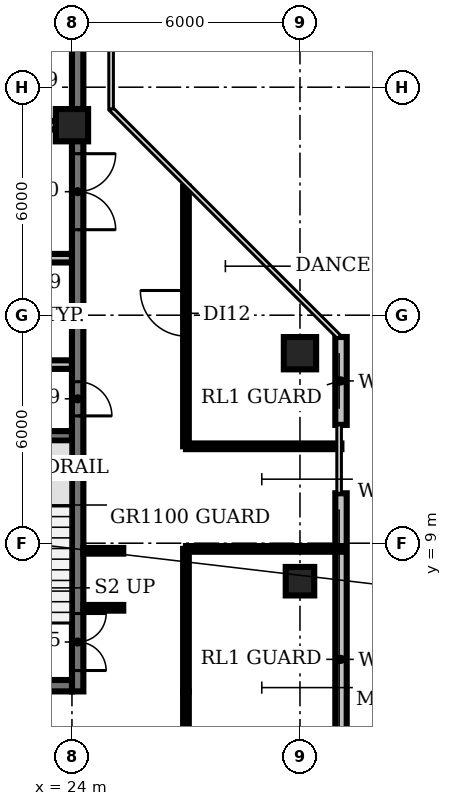
"""IFC4 building model, lengths in metres.
Left out: names, types, materials, properties, quantities, classifications, styles, units other than length and angle.
Written with IfcOpenShell. Run it as: python <this file> out.ifc"""

import sys

from ifc_helpers import new_model, si_unit, direction, frame, frame_2d, origin, origin_2d, place, context, subcontext, project, spatial, rectangle, circle, extrude, element, fill, save


model = new_model("IFC4")
c1 = context("Model", 3, precision=1e-05, world=origin(), true_north=direction((0.0, 1.0)))
c2 = subcontext(c1, "Body", "Model", "MODEL_VIEW")
j1 = project(units=[si_unit("LENGTHUNIT", "METRE"), si_unit("PLANEANGLEUNIT", "RADIAN")], contexts=[c1])
p1 = place(None, origin())
s1 = spatial("IfcSite", under=j1, at=p1, CompositionType="ELEMENT")
p2 = place(p1, origin())
s2 = spatial("IfcBuilding", under=s1, at=p2, CompositionType="ELEMENT")
p3 = place(p2, frame((0.0, 0.0, 268.4)))
s3 = spatial("IfcBuildingStorey", under=s2, at=p3, CompositionType="ELEMENT", Elevation=268.4)
p4 = place(p3, frame((24.0, 20.0, 0.0), z_axis=(0.0, 0.0, 1.0), x_axis=(1.0, 0.0, 0.0)))
e1 = element("IfcColumn", 1, at=p4, inside=s3, PredefinedType="COLUMN", context=c2, shape_type="SweptSolid", body=[
    extrude(circle(Radius=0.425, at=origin_2d()), origin(), (0.0, 0.0, 1.0), 3.8),
])
p5 = place(p3, frame((30.0, 8.0, 0.0), z_axis=(0.0, 0.0, 1.0), x_axis=(1.0, 0.0, 0.0)))
e2 = element("IfcColumn", 2, at=p5, inside=s3, PredefinedType="COLUMN", context=c2, shape_type="SweptSolid", body=[
    extrude(rectangle(XDim=0.75, YDim=0.75, at=origin_2d()), origin(), (0.0, 0.0, 1.0), 3.8),
])
p6 = place(p3, frame((30.0, 14.0, 0.0), z_axis=(0.0, 0.0, 1.0), x_axis=(1.0, 0.0, 0.0)))
e3 = element("IfcColumn", 3, at=p6, inside=s3, PredefinedType="COLUMN", context=c2, shape_type="SweptSolid", body=[
    extrude(circle(Radius=0.425, at=origin_2d()), origin(), (0.0, 0.0, 1.0), 3.8),
])
p7 = place(p3, frame((31.08, 1.573, 0.0), z_axis=(0.0, 0.0, 1.0), x_axis=(0.0, 1.0, 0.0)))
e4 = element("IfcWall", 4, at=p7, inside=s3, PredefinedType="SOLIDWALL", context=c2, shape_type="SweptSolid", body=[
    extrude(rectangle(XDim=8.74, YDim=0.3, at=frame_2d((4.37, 0.0))), origin(), (0.0, 0.0, 1.0), 3.8),
])
p8 = place(p3, frame((31.08, 12.113, 0.0), z_axis=(0.0, 0.0, 1.0), x_axis=(0.0, 1.0, 0.0)))
e5 = element("IfcWall", 5, at=p8, inside=s3, PredefinedType="SOLIDWALL", context=c2, shape_type="SweptSolid", body=[
    extrude(rectangle(XDim=2.313, YDim=0.3, at=frame_2d((1.157, 0.0))), origin(), (0.0, 0.0, 1.0), 3.8),
])
p9 = place(p3, frame((20.85, 11.825, 0.0), z_axis=(0.0, 0.0, 1.0), x_axis=(1.0, 0.0, 0.0)))
e6 = element("IfcWall", 6, at=p9, inside=s3, PredefinedType="SHEAR", context=c2, shape_type="SweptSolid", body=[
    extrude(rectangle(XDim=3.15, YDim=0.25, at=frame_2d((1.575, 0.0))), origin(), (0.0, 0.0, 1.0), 3.8),
])
p10 = place(p3, frame((16.6, 13.7, 0.0), z_axis=(0.0, 0.0, 1.0), x_axis=(1.0, 0.0, 0.0)))
e7 = element("IfcWall", 7, at=p10, inside=s3, PredefinedType="PARTITIONING", context=c2, shape_type="SweptSolid", body=[
    extrude(rectangle(XDim=7.4, YDim=0.225, at=frame_2d((3.7, 0.0))), origin(), (0.0, 0.0, 1.0), 3.8),
])
p11 = place(p3, frame((9.4, 16.5, 0.0), z_axis=(0.0, 0.0, 1.0), x_axis=(1.0, 0.0, 0.0)))
e8 = element("IfcWall", 8, at=p11, inside=s3, PredefinedType="PARTITIONING", context=c2, shape_type="SweptSolid", body=[
    extrude(rectangle(XDim=14.6, YDim=0.225, at=frame_2d((7.3, 0.0))), origin(), (0.0, 0.0, 1.0), 3.8),
])
p12 = place(p11, frame((0.85, 0.0, 0.0)))
e9 = element("IfcOpeningElement", 9, at=p12, cuts=e8, PredefinedType="OPENING", context=c2, shape_type="SweptSolid", body=[
    extrude(rectangle(XDim=0.9, YDim=2.1, at=frame_2d((0.45, 1.05))), frame((0.0, 0.123, 0.0), z_axis=(0.0, -1.0, 0.0), x_axis=(1.0, 0.0, 0.0)), (0.0, 0.0, 1.0), 0.245),
])
p13 = place(p11, frame((3.625, 0.0, 0.0)))
e10 = element("IfcOpeningElement", 10, at=p13, cuts=e8, PredefinedType="OPENING", context=c2, shape_type="SweptSolid", body=[
    extrude(rectangle(XDim=0.9, YDim=2.1, at=frame_2d((0.45, 1.05))), frame((0.0, 0.123, 0.0), z_axis=(0.0, -1.0, 0.0), x_axis=(1.0, 0.0, 0.0)), (0.0, 0.0, 1.0), 0.245),
])
p14 = place(p11, frame((7.775, 0.0, 0.0)))
e11 = element("IfcOpeningElement", 11, at=p14, cuts=e8, PredefinedType="OPENING", context=c2, shape_type="SweptSolid", body=[
    extrude(rectangle(XDim=1.0, YDim=2.1, at=frame_2d((0.5, 1.05))), frame((0.0, 0.123, 0.0), z_axis=(0.0, -1.0, 0.0), x_axis=(1.0, 0.0, 0.0)), (0.0, 0.0, 1.0), 0.245),
])
p15 = place(p11, frame((11.308, 0.0, 0.0)))
e12 = element("IfcOpeningElement", 12, at=p15, cuts=e8, PredefinedType="OPENING", context=c2, shape_type="SweptSolid", body=[
    extrude(rectangle(XDim=0.9, YDim=2.1, at=frame_2d((0.45, 1.05))), frame((0.0, 0.123, 0.0), z_axis=(0.0, -1.0, 0.0), x_axis=(1.0, 0.0, 0.0)), (0.0, 0.0, 1.0), 0.245),
])
p16 = place(p11, frame((13.083, 0.0, 0.0)))
e13 = element("IfcOpeningElement", 13, at=p16, cuts=e8, PredefinedType="OPENING", context=c2, shape_type="SweptSolid", body=[
    extrude(rectangle(XDim=0.9, YDim=2.1, at=frame_2d((0.45, 1.05))), frame((0.0, 0.123, 0.0), z_axis=(0.0, -1.0, 0.0), x_axis=(1.0, 0.0, 0.0)), (0.0, 0.0, 1.0), 0.245),
])
p17 = place(p3, frame((24.0, 20.0, 0.0), z_axis=(0.0, 0.0, 1.0), x_axis=(-1.0, 0.0, 0.0)))
e14 = element("IfcWall", 14, at=p17, inside=s3, PredefinedType="PARTITIONING", context=c2, shape_type="SweptSolid", body=[
    extrude(rectangle(XDim=14.6, YDim=0.225, at=frame_2d((7.3, 0.0))), origin(), (0.0, 0.0, 1.0), 3.8),
])
p18 = place(p17, frame((12.75, 0.0, 0.0)))
e15 = element("IfcOpeningElement", 15, at=p18, cuts=e14, PredefinedType="OPENING", context=c2, shape_type="SweptSolid", body=[
    extrude(rectangle(XDim=1.1, YDim=2.1, at=frame_2d((0.55, 1.05))), frame((0.0, 0.123, 0.0), z_axis=(0.0, -1.0, 0.0), x_axis=(1.0, 0.0, 0.0)), (0.0, 0.0, 1.0), 0.245),
])
p19 = place(p17, frame((9.95, 0.0, 0.0)))
e16 = element("IfcOpeningElement", 16, at=p19, cuts=e14, PredefinedType="OPENING", context=c2, shape_type="SweptSolid", body=[
    extrude(rectangle(XDim=1.1, YDim=2.1, at=frame_2d((0.55, 1.05))), frame((0.0, 0.123, 0.0), z_axis=(0.0, -1.0, 0.0), x_axis=(1.0, 0.0, 0.0)), (0.0, 0.0, 1.0), 0.245),
])
p20 = place(p17, frame((7.15, 0.0, 0.0)))
e17 = element("IfcOpeningElement", 17, at=p20, cuts=e14, PredefinedType="OPENING", context=c2, shape_type="SweptSolid", body=[
    extrude(rectangle(XDim=1.1, YDim=2.1, at=frame_2d((0.55, 1.05))), frame((0.0, 0.123, 0.0), z_axis=(0.0, -1.0, 0.0), x_axis=(1.0, 0.0, 0.0)), (0.0, 0.0, 1.0), 0.245),
])
p21 = place(p17, frame((4.35, 0.0, 0.0)))
e18 = element("IfcOpeningElement", 18, at=p21, cuts=e14, PredefinedType="OPENING", context=c2, shape_type="SweptSolid", body=[
    extrude(rectangle(XDim=1.1, YDim=2.1, at=frame_2d((0.55, 1.05))), frame((0.0, 0.123, 0.0), z_axis=(0.0, -1.0, 0.0), x_axis=(1.0, 0.0, 0.0)), (0.0, 0.0, 1.0), 0.245),
])
p22 = place(p17, frame((2.308, 0.0, 0.0)))
e19 = element("IfcOpeningElement", 19, at=p22, cuts=e14, PredefinedType="OPENING", context=c2, shape_type="SweptSolid", body=[
    extrude(rectangle(XDim=0.9, YDim=2.1, at=frame_2d((0.45, 1.05))), frame((0.0, 0.123, 0.0), z_axis=(0.0, -1.0, 0.0), x_axis=(1.0, 0.0, 0.0)), (0.0, 0.0, 1.0), 0.245),
])
p23 = place(p17, frame((0.633, 0.0, 0.0)))
e20 = element("IfcOpeningElement", 20, at=p23, cuts=e14, PredefinedType="OPENING", context=c2, shape_type="SweptSolid", body=[
    extrude(rectangle(XDim=0.9, YDim=2.1, at=frame_2d((0.45, 1.05))), frame((0.0, 0.123, 0.0), z_axis=(0.0, -1.0, 0.0), x_axis=(1.0, 0.0, 0.0)), (0.0, 0.0, 1.0), 0.245),
])
p24 = place(p3, frame((24.15, 25.655, 0.0), z_axis=(0.0, 0.0, 1.0), x_axis=(0.0, -1.0, 0.0)))
e21 = element("IfcWall", 21, at=p24, inside=s3, PredefinedType="SHEAR", context=c2, shape_type="SweptSolid", body=[
    extrude(rectangle(XDim=20.555, YDim=0.3, at=frame_2d((10.277, 0.0))), origin(), (0.0, 0.0, 1.0), 3.8),
])
p25 = place(p24, frame((18.505, 0.0, 0.0)))
e22 = element("IfcOpeningElement", 22, at=p25, cuts=e21, PredefinedType="OPENING", context=c2, shape_type="SweptSolid", body=[
    extrude(rectangle(XDim=1.5, YDim=2.1, at=frame_2d((0.75, 1.05))), frame((0.0, 0.16, 0.0), z_axis=(0.0, -1.0, 0.0), x_axis=(1.0, 0.0, 0.0)), (0.0, 0.0, 1.0), 0.32),
])
p26 = place(p24, frame((12.405, 0.0, 0.0)))
e23 = element("IfcOpeningElement", 23, at=p26, cuts=e21, PredefinedType="OPENING", context=c2, shape_type="SweptSolid", body=[
    extrude(rectangle(XDim=0.9, YDim=2.1, at=frame_2d((0.45, 1.05))), frame((0.0, 0.16, 0.0), z_axis=(0.0, -1.0, 0.0), x_axis=(1.0, 0.0, 0.0)), (0.0, 0.0, 1.0), 0.32),
])
p27 = place(p24, frame((6.405, 0.0, 0.0)))
e24 = element("IfcOpeningElement", 24, at=p27, cuts=e21, PredefinedType="OPENING", context=c2, shape_type="SweptSolid", body=[
    extrude(rectangle(XDim=2.0, YDim=2.1, at=frame_2d((1.0, 1.05))), frame((0.0, 0.16, 0.0), z_axis=(0.0, -1.0, 0.0), x_axis=(1.0, 0.0, 0.0)), (0.0, 0.0, 1.0), 0.32),
])
p28 = place(p3, frame((24.0, 5.25, 0.0), z_axis=(0.0, 0.0, 1.0), x_axis=(-1.0, 0.0, 0.0)))
e25 = element("IfcWall", 25, at=p28, inside=s3, PredefinedType="SHEAR", context=c2, shape_type="SweptSolid", body=[
    extrude(rectangle(XDim=18.0, YDim=0.3, at=frame_2d((9.0, 0.0))), origin(), (0.0, 0.0, 1.0), 3.8),
])
p29 = place(p28, frame((13.0, 0.0, 0.0)))
e26 = element("IfcOpeningElement", 26, at=p29, cuts=e25, PredefinedType="OPENING", context=c2, shape_type="SweptSolid", body=[
    extrude(rectangle(XDim=1.2, YDim=2.1, at=frame_2d((0.6, 1.05))), frame((0.0, 0.16, 0.0), z_axis=(0.0, -1.0, 0.0), x_axis=(1.0, 0.0, 0.0)), (0.0, 0.0, 1.0), 0.32),
])
p30 = place(p28, frame((4.9, 0.0, 0.0)))
e27 = element("IfcOpeningElement", 27, at=p30, cuts=e25, PredefinedType="OPENING", context=c2, shape_type="SweptSolid", body=[
    extrude(rectangle(XDim=1.0, YDim=2.1, at=frame_2d((0.5, 1.05))), frame((0.0, 0.16, 0.0), z_axis=(0.0, -1.0, 0.0), x_axis=(1.0, 0.0, 0.0)), (0.0, 0.0, 1.0), 0.32),
])
for number, where, z_axis, x_axis in (
    (28, (24.3, 7.3, 0.0), (0.0, 0.0, 1.0), (1.0, 0.0, 0.0)),
    (29, (24.3, 8.8, 0.0), (0.0, 0.0, 1.0), (1.0, 0.0, 0.0)),
):
    element("IfcWall", number, at=place(p3, frame(where, z_axis=z_axis, x_axis=x_axis)), inside=s3, PredefinedType="PARTITIONING", context=c2, shape_type="SweptSolid", body=[
        extrude(rectangle(XDim=1.05, YDim=0.15, at=frame_2d((0.525, 0.0))), origin(), (0.0, 0.0, 1.0), 2.85),
    ])
p31 = place(p3, frame((27.0, 1.2, 0.0), z_axis=(0.0, 0.0, 1.0), x_axis=(0.0, 1.0, 0.0)))
e30 = element("IfcWall", 30, at=p31, inside=s3, PredefinedType="PARTITIONING", context=c2, shape_type="SweptSolid", body=[
    extrude(rectangle(XDim=3.9, YDim=0.15, at=frame_2d((1.95, 0.0))), origin(), (0.0, 0.0, 1.0), 2.85),
])
p32 = place(p31, frame((1.4, 0.0, 0.0)))
e31 = element("IfcOpeningElement", 31, at=p32, cuts=e30, PredefinedType="OPENING", context=c2, shape_type="SweptSolid", body=[
    extrude(rectangle(XDim=1.2, YDim=2.1, at=frame_2d((0.6, 1.05))), frame((0.0, 0.085, 0.0), z_axis=(0.0, -1.0, 0.0), x_axis=(1.0, 0.0, 0.0)), (0.0, 0.0, 1.0), 0.17),
])
p33 = place(p3, frame((27.0, 5.1, 0.0), z_axis=(0.0, 0.0, 1.0), x_axis=(0.0, 1.0, 0.0)))
e32 = element("IfcWall", 32, at=p33, inside=s3, PredefinedType="PARTITIONING", context=c2, shape_type="SweptSolid", body=[
    extrude(rectangle(XDim=3.75, YDim=0.15, at=frame_2d((1.875, 0.0))), origin(), (0.0, 0.0, 1.0), 2.85),
])
p34 = place(p3, frame((27.0, 8.85, 0.0), z_axis=(0.0, 0.0, 1.0), x_axis=(1.0, 0.0, 0.0)))
e33 = element("IfcWall", 33, at=p34, inside=s3, PredefinedType="PARTITIONING", context=c2, shape_type="SweptSolid", body=[
    extrude(rectangle(XDim=4.09, YDim=0.15, at=frame_2d((2.045, 0.0))), origin(), (0.0, 0.0, 1.0), 2.85),
])
p35 = place(p3, frame((27.0, 11.55, 0.0), z_axis=(0.0, 0.0, 1.0), x_axis=(0.0, 1.0, 0.0)))
e34 = element("IfcWall", 34, at=p35, inside=s3, PredefinedType="PARTITIONING", context=c2, shape_type="SweptSolid", body=[
    extrude(rectangle(XDim=6.83, YDim=0.15, at=frame_2d((3.415, 0.0))), origin(), (0.0, 0.0, 1.0), 2.85),
])
p36 = place(p35, frame((2.9, 0.0, 0.0)))
e35 = element("IfcOpeningElement", 35, at=p36, cuts=e34, PredefinedType="OPENING", context=c2, shape_type="SweptSolid", body=[
    extrude(rectangle(XDim=1.2, YDim=2.1, at=frame_2d((0.6, 1.05))), frame((0.0, 0.085, 0.0), z_axis=(0.0, -1.0, 0.0), x_axis=(1.0, 0.0, 0.0)), (0.0, 0.0, 1.0), 0.17),
])
p37 = place(p3, frame((27.0, 11.55, 0.0), z_axis=(0.0, 0.0, 1.0), x_axis=(1.0, 0.0, 0.0)))
e36 = element("IfcWall", 36, at=p37, inside=s3, PredefinedType="PARTITIONING", context=c2, shape_type="SweptSolid", body=[
    extrude(rectangle(XDim=4.09, YDim=0.15, at=frame_2d((2.045, 0.0))), origin(), (0.0, 0.0, 1.0), 2.85),
])
p38 = place(p25, origin())
e37 = element("IfcDoor", 37, at=p38, inside=s3, OperationType="DOUBLE_DOOR_SINGLE_SWING", PredefinedType="DOOR", context=c2, shape_type="SweptSolid", body=[
    extrude(rectangle(XDim=1.5, YDim=2.1, at=frame_2d((0.75, 1.05))), frame((0.0, 0.025, 0.0), z_axis=(0.0, -1.0, 0.0), x_axis=(1.0, 0.0, 0.0)), (0.0, 0.0, 1.0), 0.05),
])
fill(e22, e37)
p39 = place(p26, origin())
e38 = element("IfcDoor", 38, at=p39, inside=s3, OperationType="SINGLE_SWING_RIGHT", PredefinedType="DOOR", context=c2, shape_type="SweptSolid", body=[
    extrude(rectangle(XDim=0.9, YDim=2.1, at=frame_2d((0.45, 1.05))), frame((0.0, 0.025, 0.0), z_axis=(0.0, -1.0, 0.0), x_axis=(1.0, 0.0, 0.0)), (0.0, 0.0, 1.0), 0.05),
])
fill(e23, e38)
p40 = place(p27, origin())
e39 = element("IfcDoor", 39, at=p40, inside=s3, OperationType="DOUBLE_DOOR_SINGLE_SWING", PredefinedType="DOOR", context=c2, shape_type="SweptSolid", body=[
    extrude(rectangle(XDim=2.0, YDim=2.1, at=frame_2d((1.0, 1.05))), frame((0.0, 0.025, 0.0), z_axis=(0.0, -1.0, 0.0), x_axis=(1.0, 0.0, 0.0)), (0.0, 0.0, 1.0), 0.05),
])
fill(e24, e39)
p41 = place(p36, origin())
e40 = element("IfcDoor", 40, at=p41, inside=s3, OperationType="SINGLE_SWING_RIGHT", PredefinedType="DOOR", context=c2, shape_type="SweptSolid", body=[
    extrude(rectangle(XDim=1.2, YDim=2.1, at=frame_2d((0.6, 1.05))), frame((0.0, 0.025, 0.0), z_axis=(0.0, -1.0, 0.0), x_axis=(1.0, 0.0, 0.0)), (0.0, 0.0, 1.0), 0.05),
])
fill(e35, e40)
save(model, sys.argv[1])
